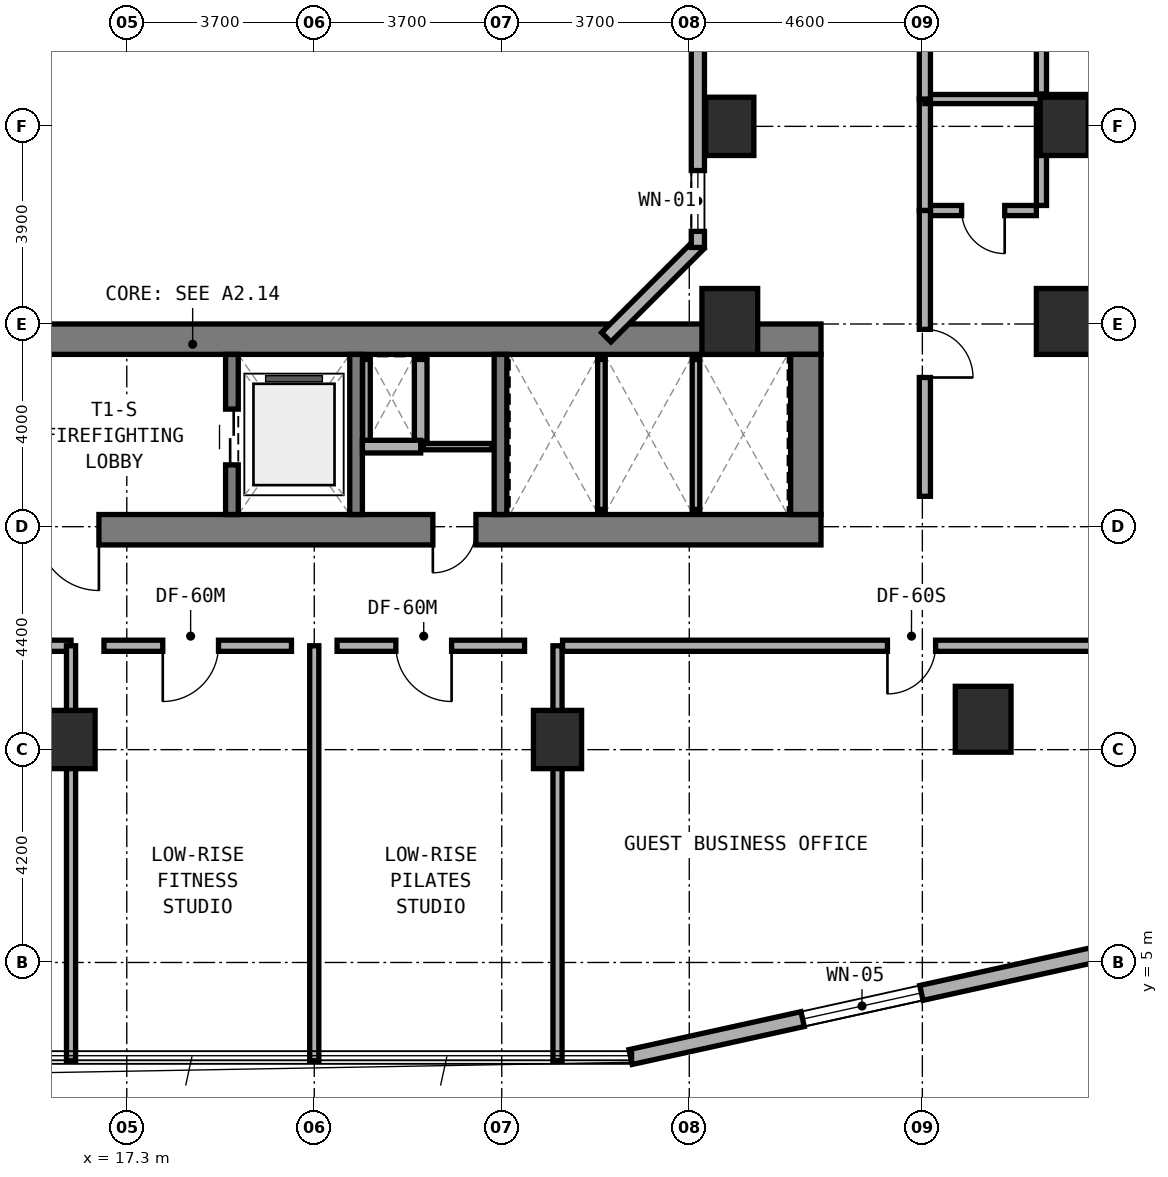
"""IFC4 building model, lengths in metres.
Left out: names, types, materials, properties, quantities, classifications, styles, units other than length and angle.
Written with IfcOpenShell. Run it as: python <this file> out.ifc"""

import sys

from ifc_helpers import new_model, si_unit, direction, frame, frame_2d, origin, origin_2d, place, context, subcontext, project, spatial, rectangle, extrude, element, fill, save


model = new_model("IFC4")
c1 = context("Model", 3, precision=1e-05, world=origin(), true_north=direction((0.0, 1.0)))
c2 = subcontext(c1, "Body", "Model", "MODEL_VIEW")
j1 = project(units=[si_unit("LENGTHUNIT", "METRE"), si_unit("PLANEANGLEUNIT", "RADIAN")], contexts=[c1])
p1 = place(None, origin())
s1 = spatial("IfcSite", under=j1, at=p1, CompositionType="ELEMENT")
p2 = place(p1, origin())
s2 = spatial("IfcBuilding", under=s1, at=p2, CompositionType="ELEMENT")
p3 = place(p2, frame((0.0, 0.0, 52.0)))
s3 = spatial("IfcBuildingStorey", under=s2, at=p3, CompositionType="ELEMENT", Elevation=52.0)
p4 = place(p3, frame((6.2, 13.54, 0.0), z_axis=(0.0, 0.0, 1.0), x_axis=(1.0, 0.0, 0.0)))
e1 = element("IfcWall", 1, at=p4, inside=s3, PredefinedType="SHEAR", context=c2, shape_type="SweptSolid", body=[
    extrude(rectangle(XDim=24.8, YDim=0.6, at=frame_2d((12.4, 0.0))), origin(), (0.0, 0.0, 1.0), 3.5),
])
p5 = place(p4, frame((9.35, 0.0, 0.0)))
e2 = element("IfcOpeningElement", 2, at=p5, cuts=e1, PredefinedType="OPENING", context=c2, shape_type="SweptSolid", body=[
    extrude(rectangle(XDim=1.2, YDim=2.15, at=frame_2d((0.6, 1.075))), frame((0.0, 0.31, 0.0), z_axis=(0.0, -1.0, 0.0), x_axis=(1.0, 0.0, 0.0)), (0.0, 0.0, 1.0), 0.62),
])
p6 = place(p4, frame((17.14, 0.0, 0.0)))
e3 = element("IfcOpeningElement", 3, at=p6, cuts=e1, PredefinedType="OPENING", context=c2, shape_type="SweptSolid", body=[
    extrude(rectangle(XDim=0.85, YDim=2.1, at=frame_2d((0.425, 1.05))), frame((0.0, 0.31, 0.0), z_axis=(0.0, -1.0, 0.0), x_axis=(1.0, 0.0, 0.0)), (0.0, 0.0, 1.0), 0.62),
])
p7 = place(p3, frame((6.2, 17.3, 0.0), z_axis=(0.0, 0.0, 1.0), x_axis=(1.0, 0.0, 0.0)))
e4 = element("IfcWall", 4, at=p7, inside=s3, PredefinedType="SHEAR", context=c2, shape_type="SweptSolid", body=[
    extrude(rectangle(XDim=24.8, YDim=0.6, at=frame_2d((12.4, 0.0))), origin(), (0.0, 0.0, 1.0), 3.5),
])
p8 = place(p3, frame((30.7, 13.84, 0.0), z_axis=(0.0, 0.0, 1.0), x_axis=(0.0, 1.0, 0.0)))
e5 = element("IfcWall", 5, at=p8, inside=s3, PredefinedType="SHEAR", context=c2, shape_type="SweptSolid", body=[
    extrude(rectangle(XDim=3.16, YDim=0.6, at=frame_2d((1.58, 0.0))), origin(), (0.0, 0.0, 1.0), 3.5),
])
p9 = place(p3, frame((19.375, 13.84, 0.0), z_axis=(0.0, 0.0, 1.0), x_axis=(0.0, 1.0, 0.0)))
e6 = element("IfcWall", 6, at=p9, inside=s3, PredefinedType="STANDARD", context=c2, shape_type="SweptSolid", body=[
    extrude(rectangle(XDim=3.16, YDim=0.25, at=frame_2d((1.58, 0.0))), origin(), (0.0, 0.0, 1.0), 3.22),
])
p10 = place(p9, frame((0.98, 0.0, 0.0)))
e7 = element("IfcOpeningElement", 7, at=p10, cuts=e6, PredefinedType="OPENING", context=c2, shape_type="SweptSolid", body=[
    extrude(rectangle(XDim=1.1, YDim=2.15, at=frame_2d((0.55, 1.075))), frame((0.0, 0.135, 0.0), z_axis=(0.0, -1.0, 0.0), x_axis=(1.0, 0.0, 0.0)), (0.0, 0.0, 1.0), 0.27),
])
for number, where, z_axis, x_axis in (
    (8, (21.825, 13.84, 0.0), (0.0, 0.0, 1.0), (0.0, 1.0, 0.0)),
    (9, (24.675, 13.84, 0.0), (0.0, 0.0, 1.0), (0.0, 1.0, 0.0)),
):
    element("IfcWall", number, at=place(p3, frame(where, z_axis=z_axis, x_axis=x_axis)), inside=s3, PredefinedType="STANDARD", context=c2, shape_type="SweptSolid", body=[
        extrude(rectangle(XDim=3.16, YDim=0.25, at=frame_2d((1.58, 0.0))), origin(), (0.0, 0.0, 1.0), 3.22),
    ])
for number, where, z_axis, x_axis in (
    (10, (16.2, 9.4, 0.0), (0.0, 0.0, 1.0), (1.0, 0.0, 0.0)),
    (11, (25.8, 9.4, 0.0), (0.0, 0.0, 1.0), (1.0, 0.0, 0.0)),
):
    element("IfcColumn", number, at=place(p3, frame(where, z_axis=z_axis, x_axis=x_axis)), inside=s3, PredefinedType="COLUMN", context=c2, shape_type="SweptSolid", body=[
        extrude(rectangle(XDim=0.95, YDim=1.15, at=origin_2d()), origin(), (0.0, 0.0, 1.0), 3.5),
    ])
p11 = place(p3, frame((34.2, 9.8, 0.0), z_axis=(0.0, 0.0, 1.0), x_axis=(1.0, 0.0, 0.0)))
e12 = element("IfcColumn", 12, at=p11, inside=s3, PredefinedType="COLUMN", context=c2, shape_type="SweptSolid", body=[
    extrude(rectangle(XDim=1.1, YDim=1.3, at=origin_2d()), origin(), (0.0, 0.0, 1.0), 3.5),
])
p12 = place(p3, frame((35.8, 21.5, 0.0), z_axis=(0.0, 0.0, 1.0), x_axis=(1.0, 0.0, 0.0)))
e13 = element("IfcColumn", 13, at=p12, inside=s3, PredefinedType="COLUMN", context=c2, shape_type="SweptSolid", body=[
    extrude(rectangle(XDim=0.95, YDim=1.15, at=origin_2d()), origin(), (0.0, 0.0, 1.0), 3.5),
])
for number, where, z_axis, x_axis in (
    (14, (35.8, 17.65, 0.0), (0.0, 0.0, 1.0), (1.0, 0.0, 0.0)),
    (15, (29.2, 17.65, 0.0), (0.0, 0.0, 1.0), (1.0, 0.0, 0.0)),
):
    element("IfcColumn", number, at=place(p3, frame(where, z_axis=z_axis, x_axis=x_axis)), inside=s3, PredefinedType="COLUMN", context=c2, shape_type="SweptSolid", body=[
        extrude(rectangle(XDim=1.1, YDim=1.3, at=origin_2d()), origin(), (0.0, 0.0, 1.0), 3.5),
    ])
p13 = place(p3, frame((29.2, 21.5, 0.0), z_axis=(0.0, 0.0, 1.0), x_axis=(1.0, 0.0, 0.0)))
e16 = element("IfcColumn", 16, at=p13, inside=s3, PredefinedType="COLUMN", context=c2, shape_type="SweptSolid", body=[
    extrude(rectangle(XDim=0.95, YDim=1.15, at=origin_2d()), origin(), (0.0, 0.0, 1.0), 3.5),
])
p14 = place(p3, frame((27.242, 3.134, 0.0), z_axis=(0.0, 0.0, 1.0), x_axis=(0.97654500432, 0.215313386808, 0.0)))
e17 = element("IfcWall", 17, at=p14, inside=s3, PredefinedType="STANDARD", context=c2, shape_type="SweptSolid", body=[
    extrude(rectangle(XDim=9.354, YDim=0.3, at=frame_2d((4.677, 0.0))), origin(), (0.0, 0.0, 1.0), 3.22),
])
p15 = place(p14, frame((3.477, 0.0, 0.8)))
e18 = element("IfcOpeningElement", 18, at=p15, cuts=e17, PredefinedType="OPENING", context=c2, shape_type="SweptSolid", body=[
    extrude(rectangle(XDim=2.4, YDim=1.6, at=frame_2d((1.2, 0.8))), frame((0.0, 0.16, 0.0), z_axis=(0.0, -1.0, 0.0), x_axis=(1.0, 0.0, 0.0)), (0.0, 0.0, 1.0), 0.32),
])
p16 = place(p3, frame((26.762, 17.338, 0.0), z_axis=(0.0, 0.0, 1.0), x_axis=(0.707059717605, 0.707153841636, 0.0)))
e19 = element("IfcWall", 19, at=p16, inside=s3, PredefinedType="STANDARD", context=c2, shape_type="SweptSolid", body=[
    extrude(rectangle(XDim=2.594, YDim=0.26, at=frame_2d((1.297, 0.0))), origin(), (0.0, 0.0, 1.0), 3.22),
])
p17 = place(p3, frame((28.57, 19.11, 0.0), z_axis=(0.0, 0.0, 1.0), x_axis=(0.0, 1.0, 0.0)))
e20 = element("IfcWall", 20, at=p17, inside=s3, PredefinedType="STANDARD", context=c2, shape_type="SweptSolid", body=[
    extrude(rectangle(XDim=11.78, YDim=0.26, at=frame_2d((5.89, 0.0))), origin(), (0.0, 0.0, 1.0), 3.22),
])
p18 = place(p17, frame((0.318, 0.0, 0.85)))
e21 = element("IfcOpeningElement", 21, at=p18, cuts=e20, PredefinedType="OPENING", context=c2, shape_type="SweptSolid", body=[
    extrude(rectangle(XDim=1.2, YDim=1.5, at=frame_2d((0.6, 0.75))), frame((0.0, 0.14, 0.0), z_axis=(0.0, -1.0, 0.0), x_axis=(1.0, 0.0, 0.0)), (0.0, 0.0, 1.0), 0.28),
])
p19 = place(p17, frame((4.99, 0.0, 0.85)))
e22 = element("IfcOpeningElement", 22, at=p19, cuts=e20, PredefinedType="OPENING", context=c2, shape_type="SweptSolid", body=[
    extrude(rectangle(XDim=1.8, YDim=1.5, at=frame_2d((0.9, 0.75))), frame((0.0, 0.14, 0.0), z_axis=(0.0, -1.0, 0.0), x_axis=(1.0, 0.0, 0.0)), (0.0, 0.0, 1.0), 0.28),
])
p20 = place(p17, frame((10.263, 0.0, 0.85)))
e23 = element("IfcOpeningElement", 23, at=p20, cuts=e20, PredefinedType="OPENING", context=c2, shape_type="SweptSolid", body=[
    extrude(rectangle(XDim=1.2, YDim=1.5, at=frame_2d((0.6, 0.75))), frame((0.0, 0.14, 0.0), z_axis=(0.0, -1.0, 0.0), x_axis=(1.0, 0.0, 0.0)), (0.0, 0.0, 1.0), 0.28),
])
p21 = place(p3, frame((22.03, 15.28, 0.0), z_axis=(0.0, 0.0, 1.0), x_axis=(0.0, 1.0, 0.0)))
e24 = element("IfcWall", 24, at=p21, inside=s3, PredefinedType="PARTITIONING", context=c2, shape_type="SweptSolid", body=[
    extrude(rectangle(XDim=1.62, YDim=0.15, at=frame_2d((0.81, 0.0))), origin(), (0.0, 0.0, 1.0), 3.22),
])
p22 = place(p3, frame((23.1, 15.28, 0.0), z_axis=(0.0, 0.0, 1.0), x_axis=(0.0, 1.0, 0.0)))
e25 = element("IfcWall", 25, at=p22, inside=s3, PredefinedType="SOLIDWALL", context=c2, shape_type="SweptSolid", body=[
    extrude(rectangle(XDim=1.62, YDim=0.25, at=frame_2d((0.81, 0.0))), origin(), (0.0, 0.0, 1.0), 3.22),
])
p23 = place(p3, frame((21.95, 15.18, 0.0), z_axis=(0.0, 0.0, 1.0), x_axis=(1.0, 0.0, 0.0)))
e26 = element("IfcWall", 26, at=p23, inside=s3, PredefinedType="SOLIDWALL", context=c2, shape_type="SweptSolid", body=[
    extrude(rectangle(XDim=1.15, YDim=0.25, at=frame_2d((0.575, 0.0))), origin(), (0.0, 0.0, 1.0), 3.22),
])
p24 = place(p3, frame((23.15, 15.18, 0.0), z_axis=(0.0, 0.0, 1.0), x_axis=(1.0, 0.0, 0.0)))
e27 = element("IfcWall", 27, at=p24, inside=s3, PredefinedType="PARTITIONING", context=c2, shape_type="SweptSolid", body=[
    extrude(rectangle(XDim=1.35, YDim=0.125, at=frame_2d((0.675, 0.0))), origin(), (0.0, 0.0, 1.0), 3.22),
])
p25 = place(p3, frame((26.667, 13.94, 0.0), z_axis=(0.0, 0.0, 1.0), x_axis=(0.0, 1.0, 0.0)))
e28 = element("IfcWall", 28, at=p25, inside=s3, PredefinedType="PARTITIONING", context=c2, shape_type="SweptSolid", body=[
    extrude(rectangle(XDim=2.96, YDim=0.15, at=frame_2d((1.48, 0.0))), origin(), (0.0, 0.0, 1.0), 3.22),
])
p26 = place(p3, frame((28.533, 13.94, 0.0), z_axis=(0.0, 0.0, 1.0), x_axis=(0.0, 1.0, 0.0)))
e29 = element("IfcWall", 29, at=p26, inside=s3, PredefinedType="PARTITIONING", context=c2, shape_type="SweptSolid", body=[
    extrude(rectangle(XDim=2.96, YDim=0.15, at=frame_2d((1.48, 0.0))), origin(), (0.0, 0.0, 1.0), 2.395),
])
p27 = place(p3, frame((5.55, 11.25, 0.0), z_axis=(0.0, 0.0, 1.0), x_axis=(1.0, 0.0, 0.0)))
e30 = element("IfcWall", 30, at=p27, inside=s3, PredefinedType="SOLIDWALL", context=c2, shape_type="SweptSolid", body=[
    extrude(rectangle(XDim=10.65, YDim=0.22, at=frame_2d((5.325, 0.0))), origin(), (0.0, 0.0, 1.0), 2.395),
])
p28 = place(p27, frame((4.85, 0.0, 0.0)))
e31 = element("IfcOpeningElement", 31, at=p28, cuts=e30, PredefinedType="OPENING", context=c2, shape_type="SweptSolid", body=[
    extrude(rectangle(XDim=0.95, YDim=2.1, at=frame_2d((0.475, 1.05))), frame((0.0, 0.12, 0.0), z_axis=(0.0, -1.0, 0.0), x_axis=(1.0, 0.0, 0.0)), (0.0, 0.0, 1.0), 0.24),
])
p29 = place(p3, frame((16.2, 3.06, 0.0), z_axis=(0.0, 0.0, 1.0), x_axis=(0.0, 1.0, 0.0)))
e32 = element("IfcWall", 32, at=p29, inside=s3, PredefinedType="SOLIDWALL", context=c2, shape_type="SweptSolid", body=[
    extrude(rectangle(XDim=8.19, YDim=0.18, at=frame_2d((4.095, 0.0))), origin(), (0.0, 0.0, 1.0), 2.395),
])
p30 = place(p3, frame((21.0, 3.06, 0.0), z_axis=(0.0, 0.0, 1.0), x_axis=(0.0, 1.0, 0.0)))
e33 = element("IfcWall", 33, at=p30, inside=s3, PredefinedType="SOLIDWALL", context=c2, shape_type="SweptSolid", body=[
    extrude(rectangle(XDim=8.19, YDim=0.18, at=frame_2d((4.095, 0.0))), origin(), (0.0, 0.0, 1.0), 2.745),
])
p31 = place(p3, frame((16.85, 11.25, 0.0), z_axis=(0.0, 0.0, 1.0), x_axis=(1.0, 0.0, 0.0)))
e34 = element("IfcWall", 34, at=p31, inside=s3, PredefinedType="SOLIDWALL", context=c2, shape_type="SweptSolid", body=[
    extrude(rectangle(XDim=3.7, YDim=0.22, at=frame_2d((1.85, 0.0))), origin(), (0.0, 0.0, 1.0), 2.745),
])
p32 = place(p31, frame((1.16, 0.0, 0.0)))
e35 = element("IfcOpeningElement", 35, at=p32, cuts=e34, PredefinedType="OPENING", context=c2, shape_type="SweptSolid", body=[
    extrude(rectangle(XDim=1.1, YDim=2.1, at=frame_2d((0.55, 1.05))), frame((0.0, 0.12, 0.0), z_axis=(0.0, -1.0, 0.0), x_axis=(1.0, 0.0, 0.0)), (0.0, 0.0, 1.0), 0.24),
])
p33 = place(p3, frame((21.45, 11.25, 0.0), z_axis=(0.0, 0.0, 1.0), x_axis=(1.0, 0.0, 0.0)))
e36 = element("IfcWall", 36, at=p33, inside=s3, PredefinedType="SOLIDWALL", context=c2, shape_type="SweptSolid", body=[
    extrude(rectangle(XDim=3.7, YDim=0.22, at=frame_2d((1.85, 0.0))), origin(), (0.0, 0.0, 1.0), 2.745),
])
p34 = place(p33, frame((1.16, 0.0, 0.0)))
e37 = element("IfcOpeningElement", 37, at=p34, cuts=e36, PredefinedType="OPENING", context=c2, shape_type="SweptSolid", body=[
    extrude(rectangle(XDim=1.1, YDim=2.1, at=frame_2d((0.55, 1.05))), frame((0.0, 0.12, 0.0), z_axis=(0.0, -1.0, 0.0), x_axis=(1.0, 0.0, 0.0)), (0.0, 0.0, 1.0), 0.24),
])
p35 = place(p3, frame((25.8, 3.06, 0.0), z_axis=(0.0, 0.0, 1.0), x_axis=(0.0, 1.0, 0.0)))
e38 = element("IfcWall", 38, at=p35, inside=s3, PredefinedType="SOLIDWALL", context=c2, shape_type="SweptSolid", body=[
    extrude(rectangle(XDim=8.19, YDim=0.18, at=frame_2d((4.095, 0.0))), origin(), (0.0, 0.0, 1.0), 2.395),
])
p36 = place(p3, frame((25.9, 11.25, 0.0), z_axis=(0.0, 0.0, 1.0), x_axis=(1.0, 0.0, 0.0)))
e39 = element("IfcWall", 39, at=p36, inside=s3, PredefinedType="SOLIDWALL", context=c2, shape_type="SweptSolid", body=[
    extrude(rectangle(XDim=15.84, YDim=0.22, at=frame_2d((7.92, 0.0))), origin(), (0.0, 0.0, 1.0), 2.395),
])
p37 = place(p36, frame((6.411, 0.0, 0.0)))
e40 = element("IfcOpeningElement", 40, at=p37, cuts=e39, PredefinedType="OPENING", context=c2, shape_type="SweptSolid", body=[
    extrude(rectangle(XDim=0.95, YDim=2.1, at=frame_2d((0.475, 1.05))), frame((0.0, 0.12, 0.0), z_axis=(0.0, -1.0, 0.0), x_axis=(1.0, 0.0, 0.0)), (0.0, 0.0, 1.0), 0.24),
])
p38 = place(p3, frame((33.15, 19.839, 0.0), z_axis=(0.0, 0.0, 1.0), x_axis=(1.0, 0.0, 0.0)))
e41 = element("IfcWall", 41, at=p38, inside=s3, PredefinedType="PLUMBINGWALL", context=c2, shape_type="SweptSolid", body=[
    extrude(rectangle(XDim=2.1, YDim=0.2, at=frame_2d((1.05, 0.0))), origin(), (0.0, 0.0, 1.0), 3.22),
])
p39 = place(p38, frame((0.625, 0.0, 0.0)))
e42 = element("IfcOpeningElement", 42, at=p39, cuts=e41, PredefinedType="OPENING", context=c2, shape_type="SweptSolid", body=[
    extrude(rectangle(XDim=0.85, YDim=2.1, at=frame_2d((0.425, 1.05))), frame((0.0, 0.11, 0.0), z_axis=(0.0, -1.0, 0.0), x_axis=(1.0, 0.0, 0.0)), (0.0, 0.0, 1.0), 0.22),
])
p40 = place(p3, frame((35.35, 19.939, 0.0), z_axis=(0.0, 0.0, 1.0), x_axis=(0.0, 1.0, 0.0)))
e43 = element("IfcWall", 43, at=p40, inside=s3, PredefinedType="PLUMBINGWALL", context=c2, shape_type="SweptSolid", body=[
    extrude(rectangle(XDim=2.0, YDim=0.2, at=frame_2d((1.0, 0.0))), origin(), (0.0, 0.0, 1.0), 2.395),
])
p41 = place(p3, frame((33.05, 19.839, 0.0), z_axis=(0.0, 0.0, 1.0), x_axis=(0.0, 1.0, 0.0)))
e44 = element("IfcWall", 44, at=p41, inside=s3, PredefinedType="SOLIDWALL", context=c2, shape_type="SweptSolid", body=[
    extrude(rectangle(XDim=2.2, YDim=0.22, at=frame_2d((1.1, 0.0))), origin(), (0.0, 0.0, 1.0), 2.395),
])
p42 = place(p3, frame((33.05, 14.2, 0.0), z_axis=(0.0, 0.0, 1.0), x_axis=(0.0, 1.0, 0.0)))
e45 = element("IfcWall", 45, at=p42, inside=s3, PredefinedType="SOLIDWALL", context=c2, shape_type="SweptSolid", body=[
    extrude(rectangle(XDim=5.639, YDim=0.22, at=frame_2d((2.82, 0.0))), origin(), (0.0, 0.0, 1.0), 2.395),
])
p43 = place(p42, frame((2.344, 0.0, 0.0)))
e46 = element("IfcOpeningElement", 46, at=p43, cuts=e45, PredefinedType="OPENING", context=c2, shape_type="SweptSolid", body=[
    extrude(rectangle(XDim=0.95, YDim=2.1, at=frame_2d((0.475, 1.05))), frame((0.0, 0.12, 0.0), z_axis=(0.0, -1.0, 0.0), x_axis=(1.0, 0.0, 0.0)), (0.0, 0.0, 1.0), 0.24),
])
p44 = place(p3, frame((33.05, 22.039, 0.0), z_axis=(0.0, 0.0, 1.0), x_axis=(1.0, 0.0, 0.0)))
e47 = element("IfcWall", 47, at=p44, inside=s3, PredefinedType="SOLIDWALL", context=c2, shape_type="SweptSolid", body=[
    extrude(rectangle(XDim=8.89, YDim=0.18, at=frame_2d((4.445, 0.0))), origin(), (0.0, 0.0, 1.0), 2.745),
])
p45 = place(p3, frame((35.35, 22.139, 0.0), z_axis=(0.0, 0.0, 1.0), x_axis=(0.0, 1.0, 0.0)))
e48 = element("IfcWall", 48, at=p45, inside=s3, PredefinedType="PLUMBINGWALL", context=c2, shape_type="SweptSolid", body=[
    extrude(rectangle(XDim=2.0, YDim=0.2, at=frame_2d((1.0, 0.0))), origin(), (0.0, 0.0, 1.0), 3.22),
])
p46 = place(p3, frame((33.05, 22.039, 0.0), z_axis=(0.0, 0.0, 1.0), x_axis=(0.0, 1.0, 0.0)))
e49 = element("IfcWall", 49, at=p46, inside=s3, PredefinedType="SOLIDWALL", context=c2, shape_type="SweptSolid", body=[
    extrude(rectangle(XDim=2.2, YDim=0.22, at=frame_2d((1.1, 0.0))), origin(), (0.0, 0.0, 1.0), 3.22),
])
p47 = place(p15, origin())
e50 = element("IfcWindow", 50, at=p47, inside=s3, PartitioningType="SINGLE_PANEL", PredefinedType="WINDOW", context=c2, shape_type="SweptSolid", body=[
    extrude(rectangle(XDim=2.4, YDim=1.6, at=frame_2d((1.2, 0.8))), frame((0.0, 0.03, 0.0), z_axis=(0.0, -1.0, 0.0), x_axis=(1.0, 0.0, 0.0)), (0.0, 0.0, 1.0), 0.06),
])
fill(e18, e50)
p48 = place(p18, origin())
e51 = element("IfcWindow", 51, at=p48, inside=s3, PartitioningType="SINGLE_PANEL", PredefinedType="WINDOW", context=c2, shape_type="SweptSolid", body=[
    extrude(rectangle(XDim=1.2, YDim=1.5, at=frame_2d((0.6, 0.75))), frame((0.0, 0.03, 0.0), z_axis=(0.0, -1.0, 0.0), x_axis=(1.0, 0.0, 0.0)), (0.0, 0.0, 1.0), 0.06),
])
fill(e21, e51)
p49 = place(p5, frame((1.2, 0.0, 0.0), z_axis=(0.0, 0.0, 1.0), x_axis=(-1.0, 0.0, 0.0)))
e52 = element("IfcDoor", 52, at=p49, inside=s3, OperationType="SINGLE_SWING_LEFT", PredefinedType="DOOR", context=c2, shape_type="SweptSolid", body=[
    extrude(rectangle(XDim=1.2, YDim=2.15, at=frame_2d((0.6, 1.075))), frame((0.0, 0.025, 0.0), z_axis=(0.0, -1.0, 0.0), x_axis=(1.0, 0.0, 0.0)), (0.0, 0.0, 1.0), 0.05),
])
fill(e2, e52)
p50 = place(p10, origin())
e53 = element("IfcDoor", 53, at=p50, inside=s3, OperationType="DOUBLE_DOOR_SLIDING", PredefinedType="DOOR", context=c2, shape_type="SweptSolid", body=[
    extrude(rectangle(XDim=1.1, YDim=2.15, at=frame_2d((0.55, 1.075))), frame((0.0, 0.025, 0.0), z_axis=(0.0, -1.0, 0.0), x_axis=(1.0, 0.0, 0.0)), (0.0, 0.0, 1.0), 0.05),
])
fill(e7, e53)
p51 = place(p6, frame((0.85, 0.0, 0.0), z_axis=(0.0, 0.0, 1.0), x_axis=(-1.0, 0.0, 0.0)))
e54 = element("IfcDoor", 54, at=p51, inside=s3, OperationType="SINGLE_SWING_RIGHT", PredefinedType="DOOR", context=c2, shape_type="SweptSolid", body=[
    extrude(rectangle(XDim=0.85, YDim=2.1, at=frame_2d((0.425, 1.05))), frame((0.0, 0.025, 0.0), z_axis=(0.0, -1.0, 0.0), x_axis=(1.0, 0.0, 0.0)), (0.0, 0.0, 1.0), 0.05),
])
fill(e3, e54)
p52 = place(p32, frame((1.1, 0.0, 0.0), z_axis=(0.0, 0.0, 1.0), x_axis=(-1.0, 0.0, 0.0)))
e55 = element("IfcDoor", 55, at=p52, inside=s3, OperationType="SINGLE_SWING_RIGHT", PredefinedType="DOOR", context=c2, shape_type="SweptSolid", body=[
    extrude(rectangle(XDim=1.1, YDim=2.1, at=frame_2d((0.55, 1.05))), frame((0.0, 0.025, 0.0), z_axis=(0.0, -1.0, 0.0), x_axis=(1.0, 0.0, 0.0)), (0.0, 0.0, 1.0), 0.05),
])
fill(e35, e55)
p53 = place(p34, frame((1.1, 0.0, 0.0), z_axis=(0.0, 0.0, 1.0), x_axis=(-1.0, 0.0, 0.0)))
e56 = element("IfcDoor", 56, at=p53, inside=s3, OperationType="SINGLE_SWING_LEFT", PredefinedType="DOOR", context=c2, shape_type="SweptSolid", body=[
    extrude(rectangle(XDim=1.1, YDim=2.1, at=frame_2d((0.55, 1.05))), frame((0.0, 0.025, 0.0), z_axis=(0.0, -1.0, 0.0), x_axis=(1.0, 0.0, 0.0)), (0.0, 0.0, 1.0), 0.05),
])
fill(e37, e56)
p54 = place(p37, frame((0.95, 0.0, 0.0), z_axis=(0.0, 0.0, 1.0), x_axis=(-1.0, 0.0, 0.0)))
e57 = element("IfcDoor", 57, at=p54, inside=s3, OperationType="SINGLE_SWING_RIGHT", PredefinedType="DOOR", context=c2, shape_type="SweptSolid", body=[
    extrude(rectangle(XDim=0.95, YDim=2.1, at=frame_2d((0.475, 1.05))), frame((0.0, 0.025, 0.0), z_axis=(0.0, -1.0, 0.0), x_axis=(1.0, 0.0, 0.0)), (0.0, 0.0, 1.0), 0.05),
])
fill(e40, e57)
p55 = place(p39, frame((0.85, 0.0, 0.0), z_axis=(0.0, 0.0, 1.0), x_axis=(-1.0, 0.0, 0.0)))
e58 = element("IfcDoor", 58, at=p55, inside=s3, OperationType="SINGLE_SWING_LEFT", PredefinedType="DOOR", context=c2, shape_type="SweptSolid", body=[
    extrude(rectangle(XDim=0.85, YDim=2.1, at=frame_2d((0.425, 1.05))), frame((0.0, 0.025, 0.0), z_axis=(0.0, -1.0, 0.0), x_axis=(1.0, 0.0, 0.0)), (0.0, 0.0, 1.0), 0.05),
])
fill(e42, e58)
p56 = place(p43, frame((0.95, 0.0, 0.0), z_axis=(0.0, 0.0, 1.0), x_axis=(-1.0, 0.0, 0.0)))
e59 = element("IfcDoor", 59, at=p56, inside=s3, OperationType="SINGLE_SWING_RIGHT", PredefinedType="DOOR", context=c2, shape_type="SweptSolid", body=[
    extrude(rectangle(XDim=0.95, YDim=2.1, at=frame_2d((0.475, 1.05))), frame((0.0, 0.025, 0.0), z_axis=(0.0, -1.0, 0.0), x_axis=(1.0, 0.0, 0.0)), (0.0, 0.0, 1.0), 0.05),
])
fill(e46, e59)
save(model, sys.argv[1])
